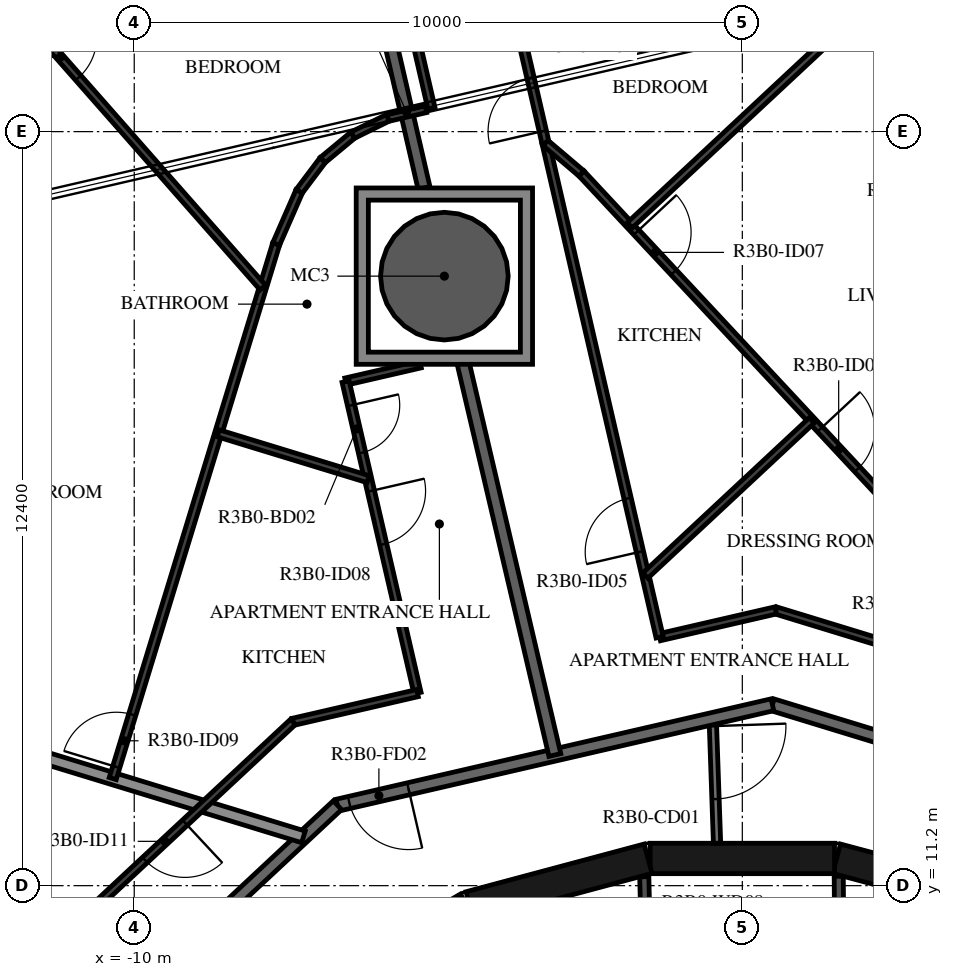
"""IFC4 building model, lengths in metres.
Left out: names, types, materials, properties, quantities, classifications, styles, units other than length and angle.
Written with IfcOpenShell. Run it as: python <this file> out.ifc"""

import sys

from ifc_helpers import new_model, si_unit, direction, frame, frame_2d, origin, origin_2d, place, context, subcontext, project, spatial, polyline, rectangle, hollow_circle, outline, extrude, element, fill, save


model = new_model("IFC4")
c1 = context("Model", 3, precision=1e-05, world=origin(), true_north=direction((0.0, 1.0)))
c2 = subcontext(c1, "Body", "Model", "MODEL_VIEW")
j1 = project(units=[si_unit("LENGTHUNIT", "METRE"), si_unit("PLANEANGLEUNIT", "RADIAN")], contexts=[c1])
p1 = place(None, origin())
s1 = spatial("IfcSite", under=j1, at=p1, CompositionType="ELEMENT")
p2 = place(p1, origin())
s2 = spatial("IfcBuilding", under=s1, at=p2, CompositionType="ELEMENT")
p3 = place(p2, frame((0.0, 0.0, 127.4)))
s3 = spatial("IfcBuildingStorey", under=s2, at=p3, CompositionType="ELEMENT", Elevation=127.4)
p4 = place(p3, frame((-4.9, 21.223, -0.38), z_axis=(0.0, 0.0, 1.0), x_axis=(1.0, 0.0, 0.0)))
e1 = element("IfcColumn", 1, at=p4, inside=s3, PredefinedType="COLUMN", context=c2, shape_type="SweptSolid", body=[
    extrude(hollow_circle(Radius=1.05, WallThickness=0.05, at=origin_2d()), origin(), (0.0, 0.0, 1.0), 3.5),
])
for number, where, z_axis, x_axis in (
    (2, (4.479, 10.858, 0.0), (0.0, 0.0, 1.0), (-0.966, 0.259, 0.0)),
    (3, (1.516, 11.647, 0.0), (0.0, 0.0, 1.0), (-1.0, 0.0, 0.0)),
    (4, (-1.55, 11.643, 0.0), (0.0, 0.0, 1.0), (-0.966, -0.259, 0.0)),
    (5, (-4.51, 10.845, 0.0), (0.0, 0.0, 1.0), (-0.866, -0.5, 0.0)),
):
    element("IfcWall", number, at=place(p3, frame(where, z_axis=z_axis, x_axis=x_axis)), inside=s3, PredefinedType="SHEAR", context=c2, shape_type="SweptSolid", body=[
        extrude(rectangle(XDim=3.033, YDim=0.5, at=frame_2d((1.516, 0.0))), origin(), (0.0, 0.0, 1.0), 3.12),
    ])
p5 = place(p3, frame((1.586, 11.354, 0.0), z_axis=(0.0, 0.0, 1.0), x_axis=(0.007227482881, -0.999973881405, 0.0)))
e6 = element("IfcWall", 6, at=p5, inside=s3, PredefinedType="PARTITIONING", context=c2, shape_type="SweptSolid", body=[
    extrude(rectangle(XDim=2.365, YDim=0.15, at=frame_2d((1.182, 0.0))), origin(), (0.0, 0.0, 1.0), 3.12),
])
p6 = place(p5, frame((0.732, 0.0, 0.0)))
e7 = element("IfcOpeningElement", 7, at=p6, cuts=e6, PredefinedType="OPENING", context=c2, shape_type="SweptSolid", body=[
    extrude(rectangle(XDim=0.9, YDim=2.1, at=frame_2d((0.45, 1.05))), frame((0.0, 0.085, 0.0), z_axis=(0.0, -1.0, 0.0), x_axis=(1.0, 0.0, 0.0)), (0.0, 0.0, 1.0), 0.17),
])
p7 = place(p3, frame((-1.555, 8.99, 0.0), z_axis=(0.0, 0.0, 1.0), x_axis=(-0.024125549686, 0.999708936567, 0.0)))
e8 = element("IfcWall", 8, at=p7, inside=s3, PredefinedType="PARTITIONING", context=c2, shape_type="SweptSolid", body=[
    extrude(rectangle(XDim=2.358, YDim=0.15, at=frame_2d((1.179, 0.0))), origin(), (0.0, 0.0, 1.0), 3.12),
])
p8 = place(p7, frame((0.729, 0.0, 0.0)))
e9 = element("IfcOpeningElement", 9, at=p8, cuts=e8, PredefinedType="OPENING", context=c2, shape_type="SweptSolid", body=[
    extrude(rectangle(XDim=0.9, YDim=2.1, at=frame_2d((0.45, 1.05))), frame((0.0, 0.085, 0.0), z_axis=(0.0, -1.0, 0.0), x_axis=(1.0, 0.0, 0.0)), (0.0, 0.0, 1.0), 0.17),
])
p9 = place(p3, frame((-0.487, 13.948, 0.0), z_axis=(0.0, 0.0, 1.0), x_axis=(0.034859752231, -0.999392214135, 0.0)))
e10 = element("IfcWall", 10, at=p9, inside=s3, PredefinedType="PARTITIONING", context=c2, shape_type="SweptSolid", body=[
    extrude(rectangle(XDim=2.052, YDim=0.12, at=frame_2d((1.026, 0.0))), origin(), (0.0, 0.0, 1.0), 3.12),
])
p10 = place(p9, frame((0.125, 0.0, 0.0)))
e11 = element("IfcOpeningElement", 11, at=p10, cuts=e10, PredefinedType="OPENING", context=c2, shape_type="SweptSolid", body=[
    extrude(rectangle(XDim=1.2, YDim=2.1, at=frame_2d((0.6, 1.05))), frame((0.0, 0.07, 0.0), z_axis=(0.0, -1.0, 0.0), x_axis=(1.0, 0.0, 0.0)), (0.0, 0.0, 1.0), 0.14),
])
p11 = place(p3, frame((7.516, 12.028, 0.0), z_axis=(0.0, 0.0, 1.0), x_axis=(-0.956306642771, 0.292365533182, 0.0)))
e12 = element("IfcWall", 12, at=p11, inside=s3, PredefinedType="STANDARD", context=c2, shape_type="SweptSolid", body=[
    extrude(rectangle(XDim=7.342, YDim=0.2, at=frame_2d((3.671, 0.0))), origin(), (0.0, 0.0, 1.0), 3.12),
])
p12 = place(p3, frame((0.495, 14.175, 0.0), z_axis=(0.0, 0.0, 1.0), x_axis=(-0.974376622151, -0.224922649383, 0.0)))
e13 = element("IfcWall", 13, at=p12, inside=s3, PredefinedType="STANDARD", context=c2, shape_type="SweptSolid", body=[
    extrude(rectangle(XDim=7.342, YDim=0.2, at=frame_2d((3.671, 0.0))), origin(), (0.0, 0.0, 1.0), 3.12),
])
p13 = place(p12, frame((6.142, 0.0, 0.0)))
e14 = element("IfcOpeningElement", 14, at=p13, cuts=e13, PredefinedType="OPENING", context=c2, shape_type="SweptSolid", body=[
    extrude(rectangle(XDim=1.0, YDim=2.1, at=frame_2d((0.5, 1.05))), frame((0.0, 0.11, 0.0), z_axis=(0.0, -1.0, 0.0), x_axis=(1.0, 0.0, 0.0)), (0.0, 0.0, 1.0), 0.22),
])
p14 = place(p3, frame((-6.659, 12.523, 0.0), z_axis=(0.0, 0.0, 1.0), x_axis=(-0.731350455479, -0.682001841105, 0.0)))
e15 = element("IfcWall", 15, at=p14, inside=s3, PredefinedType="STANDARD", context=c2, shape_type="SweptSolid", body=[
    extrude(rectangle(XDim=7.342, YDim=0.2, at=frame_2d((3.671, 0.0))), origin(), (0.0, 0.0, 1.0), 3.12),
])
p15 = place(p14, frame((4.264, 0.0, 0.0)))
e16 = element("IfcOpeningElement", 16, at=p15, cuts=e15, PredefinedType="OPENING", context=c2, shape_type="SweptSolid", body=[
    extrude(rectangle(XDim=1.0, YDim=2.1, at=frame_2d((0.5, 1.05))), frame((0.0, 0.11, 0.0), z_axis=(0.0, -1.0, 0.0), x_axis=(1.0, 0.0, 0.0)), (0.0, 0.0, 1.0), 0.22),
])
p16 = place(p3, frame((-4.602, 19.839, 0.0), z_axis=(0.0, 0.0, 1.0), x_axis=(0.227891855607, -0.973686449607, 0.0)))
e17 = element("IfcWall", 17, at=p16, inside=s3, PredefinedType="STANDARD", context=c2, shape_type="SweptSolid", body=[
    extrude(rectangle(XDim=6.666, YDim=0.2, at=frame_2d((3.333, 0.0))), origin(), (0.0, 0.0, 1.0), 3.12),
])
p17 = place(p3, frame((-6.687, 28.966, 0.0), z_axis=(0.0, 0.0, 1.0), x_axis=(0.224945100086, -0.974371439415, 0.0)))
e18 = element("IfcWall", 18, at=p17, inside=s3, PredefinedType="STANDARD", context=c2, shape_type="SweptSolid", body=[
    extrude(rectangle(XDim=6.458, YDim=0.2, at=frame_2d((3.229, 0.0))), origin(), (0.0, 0.0, 1.0), 3.12),
])
p18 = place(p3, frame((-15.327, 14.481, 0.0), z_axis=(0.0, 0.0, 1.0), x_axis=(0.956303504869, -0.292375796837, 0.0)))
e19 = element("IfcWall", 19, at=p18, inside=s3, PredefinedType="STANDARD", context=c2, shape_type="SweptSolid", body=[
    extrude(rectangle(XDim=8.48, YDim=0.2, at=frame_2d((4.24, 0.0))), origin(), (0.0, 0.0, 1.0), 2.73),
])
p19 = place(p3, frame((5.453, 14.228, 0.0), z_axis=(0.0, 0.0, 1.0), x_axis=(-0.95630868333, 0.292358858576, 0.0)))
e20 = element("IfcWall", 20, at=p19, inside=s3, PredefinedType="PARTITIONING", context=c2, shape_type="SweptSolid", body=[
    extrude(rectangle(XDim=5.127, YDim=0.12, at=frame_2d((2.564, 0.0))), origin(), (0.0, 0.0, 1.0), 3.12),
])
p20 = place(p19, frame((1.5, 0.0, 0.0)))
e21 = element("IfcOpeningElement", 21, at=p20, cuts=e20, PredefinedType="OPENING", context=c2, shape_type="SweptSolid", body=[
    extrude(rectangle(XDim=0.9, YDim=2.1, at=frame_2d((0.45, 1.05))), frame((0.0, 0.07, 0.0), z_axis=(0.0, -1.0, 0.0), x_axis=(1.0, 0.0, 0.0)), (0.0, 0.0, 1.0), 0.14),
])
p21 = place(p3, frame((0.549, 15.727, 0.0), z_axis=(0.0, 0.0, 1.0), x_axis=(-0.974374390785, -0.22493231556, 0.0)))
e22 = element("IfcWall", 22, at=p21, inside=s3, PredefinedType="PARTITIONING", context=c2, shape_type="SweptSolid", body=[
    extrude(rectangle(XDim=1.959, YDim=0.12, at=frame_2d((0.979, 0.0))), origin(), (0.0, 0.0, 1.0), 3.12),
])
p22 = place(p3, frame((-1.36, 15.286, 0.0), z_axis=(0.0, 0.0, 1.0), x_axis=(-0.224974943676, 0.97436454919, 0.0)))
e23 = element("IfcWall", 23, at=p22, inside=s3, PredefinedType="PARTITIONING", context=c2, shape_type="SweptSolid", body=[
    extrude(rectangle(XDim=8.341, YDim=0.12, at=frame_2d((4.17, 0.0))), origin(), (0.0, 0.0, 1.0), 3.12),
])
p23 = place(p22, frame((1.441, 0.0, 0.0)))
e24 = element("IfcOpeningElement", 24, at=p23, cuts=e23, PredefinedType="OPENING", context=c2, shape_type="SweptSolid", body=[
    extrude(rectangle(XDim=0.9, YDim=2.1, at=frame_2d((0.45, 1.05))), frame((0.0, 0.07, 0.0), z_axis=(0.0, -1.0, 0.0), x_axis=(1.0, 0.0, 0.0)), (0.0, 0.0, 1.0), 0.14),
])
p24 = place(p3, frame((-3.236, 23.413, 0.0), z_axis=(0.0, 0.0, 1.0), x_axis=(-0.224934720918, 0.97437383551, 0.0)))
e25 = element("IfcWall", 25, at=p24, inside=s3, PredefinedType="PARTITIONING", context=c2, shape_type="SweptSolid", body=[
    extrude(rectangle(XDim=4.03, YDim=0.12, at=frame_2d((2.015, 0.0))), origin(), (0.0, 0.0, 1.0), 3.12),
])
p25 = place(p24, frame((0.2, 0.0, 0.0)))
e26 = element("IfcOpeningElement", 26, at=p25, cuts=e25, PredefinedType="OPENING", context=c2, shape_type="SweptSolid", body=[
    extrude(rectangle(XDim=0.9, YDim=2.1, at=frame_2d((0.45, 1.05))), frame((0.0, 0.07, 0.0), z_axis=(0.0, -1.0, 0.0), x_axis=(1.0, 0.0, 0.0)), (0.0, 0.0, 1.0), 0.14),
])
p26 = place(p3, frame((-5.799, 26.957, 0.0), z_axis=(0.0, 0.0, 1.0), x_axis=(0.224876960008, -0.974387167843, 0.0)))
e27 = element("IfcWall", 27, at=p26, inside=s3, PredefinedType="PARTITIONING", context=c2, shape_type="SweptSolid", body=[
    extrude(rectangle(XDim=3.065, YDim=0.12, at=frame_2d((1.532, 0.0))), origin(), (0.0, 0.0, 1.0), 3.12),
])
p27 = place(p3, frame((-5.205, 23.971, 0.0), z_axis=(0.0, 0.0, 1.0), x_axis=(-0.974410422398, -0.224776174722, 0.0)))
e28 = element("IfcWall", 28, at=p27, inside=s3, PredefinedType="PARTITIONING", context=c2, shape_type="SweptSolid", body=[
    extrude(rectangle(XDim=0.642, YDim=0.12, at=frame_2d((0.321, 0.0))), origin(), (0.0, 0.0, 1.0), 3.12),
])
p28 = place(p3, frame((-2.646, 22.912, 0.0), z_axis=(0.0, 0.0, 1.0), x_axis=(0.68200318122, -0.731349205788, 0.0)))
e29 = element("IfcWall", 29, at=p28, inside=s3, PredefinedType="PARTITIONING", context=c2, shape_type="SweptSolid", body=[
    extrude(rectangle(XDim=11.874, YDim=0.12, at=frame_2d((5.937, 0.0))), origin(), (0.0, 0.0, 1.0), 3.12),
])
p29 = place(p28, frame((5.752, 0.0, 0.0)))
e30 = element("IfcOpeningElement", 30, at=p29, cuts=e29, PredefinedType="OPENING", context=c2, shape_type="SweptSolid", body=[
    extrude(rectangle(XDim=0.9, YDim=2.1, at=frame_2d((0.45, 1.05))), frame((0.0, 0.07, 0.0), z_axis=(0.0, -1.0, 0.0), x_axis=(1.0, 0.0, 0.0)), (0.0, 0.0, 1.0), 0.14),
])
p30 = place(p28, frame((1.324, 0.0, 0.0)))
e31 = element("IfcOpeningElement", 31, at=p30, cuts=e29, PredefinedType="OPENING", context=c2, shape_type="SweptSolid", body=[
    extrude(rectangle(XDim=0.9, YDim=2.1, at=frame_2d((0.45, 1.05))), frame((0.0, 0.07, 0.0), z_axis=(0.0, -1.0, 0.0), x_axis=(1.0, 0.0, 0.0)), (0.0, 0.0, 1.0), 0.14),
])
p31 = place(p3, frame((1.951, 25.607, 0.0), z_axis=(0.0, 0.0, 1.0), x_axis=(-0.73134872518, -0.682003696601, 0.0)))
e32 = element("IfcWall", 32, at=p31, inside=s3, PredefinedType="PARTITIONING", context=c2, shape_type="SweptSolid", body=[
    extrude(rectangle(XDim=5.2, YDim=0.12, at=frame_2d((2.6, 0.0))), origin(), (0.0, 0.0, 1.0), 2.73),
])
p32 = place(p3, frame((1.141, 18.851, 0.0), z_axis=(0.0, 0.0, 1.0), x_axis=(-0.731352611136, -0.68199952946, 0.0)))
e33 = element("IfcWall", 33, at=p32, inside=s3, PredefinedType="PARTITIONING", context=c2, shape_type="SweptSolid", body=[
    extrude(rectangle(XDim=3.74, YDim=0.12, at=frame_2d((1.87, 0.0))), origin(), (0.0, 0.0, 1.0), 3.12),
])
p33 = place(p3, frame((-3.236, 23.413, 0.0), z_axis=(0.0, 0.0, 1.0), x_axis=(0.762429029489, -0.647071846855, 0.0)))
e34 = element("IfcWall", 34, at=p33, inside=s3, PredefinedType="PARTITIONING", context=c2, shape_type="SweptSolid", body=[
    extrude(rectangle(XDim=0.775, YDim=0.12, at=frame_2d((0.387, 0.0))), origin(), (0.0, 0.0, 1.0), 3.12),
])
p34 = place(p3, frame((-5.293, 19.773, 0.0), z_axis=(0.0, 0.0, 1.0), x_axis=(-0.974391195695, -0.224859506699, 0.0)))
e35 = element("IfcWall", 35, at=p34, inside=s3, PredefinedType="PARTITIONING", context=c2, shape_type="SweptSolid", body=[
    extrude(rectangle(XDim=1.264, YDim=0.12, at=frame_2d((0.632, 0.0))), origin(), (0.0, 0.0, 1.0), 3.12),
])
p35 = place(p3, frame((-6.524, 19.489, 0.0), z_axis=(0.0, 0.0, 1.0), x_axis=(0.22494768659, -0.974370842286, 0.0)))
e36 = element("IfcWall", 36, at=p35, inside=s3, PredefinedType="PARTITIONING", context=c2, shape_type="SweptSolid", body=[
    extrude(rectangle(XDim=5.257, YDim=0.12, at=frame_2d((2.629, 0.0))), origin(), (0.0, 0.0, 1.0), 3.12),
])
p36 = place(p35, frame((0.4, 0.0, 0.0)))
e37 = element("IfcOpeningElement", 37, at=p36, cuts=e36, PredefinedType="OPENING", context=c2, shape_type="SweptSolid", body=[
    extrude(rectangle(XDim=0.8, YDim=2.1, at=frame_2d((0.4, 1.05))), frame((0.0, 0.07, 0.0), z_axis=(0.0, -1.0, 0.0), x_axis=(1.0, 0.0, 0.0)), (0.0, 0.0, 1.0), 0.14),
])
p37 = place(p35, frame((1.846, 0.0, 0.0)))
e38 = element("IfcOpeningElement", 38, at=p37, cuts=e36, PredefinedType="OPENING", context=c2, shape_type="SweptSolid", body=[
    extrude(rectangle(XDim=0.9, YDim=2.1, at=frame_2d((0.45, 1.05))), frame((0.0, 0.07, 0.0), z_axis=(0.0, -1.0, 0.0), x_axis=(1.0, 0.0, 0.0)), (0.0, 0.0, 1.0), 0.14),
])
p38 = place(p3, frame((-5.342, 14.367, 0.0), z_axis=(0.0, 0.0, 1.0), x_axis=(-0.974367677287, -0.224961395484, 0.0)))
e39 = element("IfcWall", 39, at=p38, inside=s3, PredefinedType="PARTITIONING", context=c2, shape_type="SweptSolid", body=[
    extrude(rectangle(XDim=2.1, YDim=0.12, at=frame_2d((1.05, 0.0))), origin(), (0.0, 0.0, 1.0), 3.12),
])
p39 = place(p3, frame((-7.388, 13.894, 0.0), z_axis=(0.0, 0.0, 1.0), x_axis=(-0.731357186721, -0.681994622729, 0.0)))
e40 = element("IfcWall", 40, at=p39, inside=s3, PredefinedType="PARTITIONING", context=c2, shape_type="SweptSolid", body=[
    extrude(rectangle(XDim=8.146, YDim=0.12, at=frame_2d((4.073, 0.0))), origin(), (0.0, 0.0, 1.0), 3.12),
])
p40 = place(p39, frame((2.432, 0.0, 0.0)))
e41 = element("IfcOpeningElement", 41, at=p40, cuts=e40, PredefinedType="OPENING", context=c2, shape_type="SweptSolid", body=[
    extrude(rectangle(XDim=0.9, YDim=2.1, at=frame_2d((0.45, 1.05))), frame((0.0, 0.07, 0.0), z_axis=(0.0, -1.0, 0.0), x_axis=(1.0, 0.0, 0.0)), (0.0, 0.0, 1.0), 0.14),
])
p41 = place(p39, frame((7.046, 0.0, 0.0)))
e42 = element("IfcOpeningElement", 42, at=p41, cuts=e40, PredefinedType="OPENING", context=c2, shape_type="SweptSolid", body=[
    extrude(rectangle(XDim=0.9, YDim=2.1, at=frame_2d((0.45, 1.05))), frame((0.0, 0.07, 0.0), z_axis=(0.0, -1.0, 0.0), x_axis=(1.0, 0.0, 0.0)), (0.0, 0.0, 1.0), 0.14),
])
p42 = place(p3, frame((-10.354, 12.961, 0.0), z_axis=(0.0, 0.0, 1.0), x_axis=(0.292379778045, 0.956302287663, 0.0)))
e43 = element("IfcWall", 43, at=p42, inside=s3, PredefinedType="PARTITIONING", context=c2, shape_type="SweptSolid", body=[
    extrude(rectangle(XDim=9.194, YDim=0.12, at=frame_2d((4.597, 0.0))), origin(), (0.0, 0.0, 1.0), 3.12),
])
p43 = place(p42, frame((0.2, 0.0, 0.0)))
e44 = element("IfcOpeningElement", 44, at=p43, cuts=e43, PredefinedType="OPENING", context=c2, shape_type="SweptSolid", body=[
    extrude(rectangle(XDim=0.9, YDim=2.1, at=frame_2d((0.45, 1.05))), frame((0.0, 0.07, 0.0), z_axis=(0.0, -1.0, 0.0), x_axis=(1.0, 0.0, 0.0)), (0.0, 0.0, 1.0), 0.14),
])
p44 = place(p3, frame((-7.666, 21.753, 0.0), z_axis=(0.0, 0.0, 1.0), x_axis=(0.401562829944, 0.915831476642, 0.0)))
e45 = element("IfcWall", 45, at=p44, inside=s3, PredefinedType="PARTITIONING", context=c2, shape_type="SweptSolid", body=[
    extrude(rectangle(XDim=0.947, YDim=0.12, at=frame_2d((0.473, 0.0))), origin(), (0.0, 0.0, 1.0), 3.12),
])
p45 = place(p3, frame((-7.286, 22.62, 0.0), z_axis=(0.0, 0.0, 1.0), x_axis=(0.601702575527, 0.798720233, 0.0)))
e46 = element("IfcWall", 46, at=p45, inside=s3, PredefinedType="PARTITIONING", context=c2, shape_type="SweptSolid", body=[
    extrude(rectangle(XDim=0.642, YDim=0.12, at=frame_2d((0.321, 0.0))), origin(), (0.0, 0.0, 1.0), 3.12),
])
p46 = place(p3, frame((-6.9, 23.132, 0.0), z_axis=(0.0, 0.0, 1.0), x_axis=(0.769653132962, 0.638462258025, 0.0)))
e47 = element("IfcWall", 47, at=p46, inside=s3, PredefinedType="PARTITIONING", context=c2, shape_type="SweptSolid", body=[
    extrude(rectangle(XDim=0.642, YDim=0.12, at=frame_2d((0.321, 0.0))), origin(), (0.0, 0.0, 1.0), 3.12),
])
p47 = place(p3, frame((-6.406, 23.542, 0.0), z_axis=(0.0, 0.0, 1.0), x_axis=(0.896245703043, 0.44355793283, 0.0)))
e48 = element("IfcWall", 48, at=p47, inside=s3, PredefinedType="PARTITIONING", context=c2, shape_type="SweptSolid", body=[
    extrude(rectangle(XDim=0.642, YDim=0.12, at=frame_2d((0.321, 0.0))), origin(), (0.0, 0.0, 1.0), 3.12),
])
p48 = place(p3, frame((-11.713, 25.385, 0.0), z_axis=(0.0, 0.0, 1.0), x_axis=(0.660694383024, -0.750655002142, 0.0)))
e49 = element("IfcWall", 49, at=p48, inside=s3, PredefinedType="PARTITIONING", context=c2, shape_type="SweptSolid", body=[
    extrude(rectangle(XDim=5.794, YDim=0.12, at=frame_2d((2.897, 0.0))), origin(), (0.0, 0.0, 1.0), 3.12),
])
p49 = place(p48, frame((0.3, 0.0, 0.0)))
e50 = element("IfcOpeningElement", 50, at=p49, cuts=e49, PredefinedType="OPENING", context=c2, shape_type="SweptSolid", body=[
    extrude(rectangle(XDim=0.9, YDim=2.1, at=frame_2d((0.45, 1.05))), frame((0.0, 0.07, 0.0), z_axis=(0.0, -1.0, 0.0), x_axis=(1.0, 0.0, 0.0)), (0.0, 0.0, 1.0), 0.14),
])
p50 = place(p3, frame((-8.618, 18.639, 0.0), z_axis=(0.0, 0.0, 1.0), x_axis=(0.956305961168, -0.292367762647, 0.0)))
e51 = element("IfcWall", 51, at=p50, inside=s3, PredefinedType="PARTITIONING", context=c2, shape_type="SweptSolid", body=[
    extrude(rectangle(XDim=2.577, YDim=0.12, at=frame_2d((1.289, 0.0))), origin(), (0.0, 0.0, 1.0), 3.12),
])
p51 = place(p3, origin())
e52 = element("IfcWall", 52, at=p51, inside=s3, PredefinedType="STANDARD", context=c2, shape_type="SweptSolid", body=[
    extrude(outline(polyline([(-3.45, 22.674), (-3.45, 19.773), (-6.35, 19.773), (-6.35, 22.674), (-3.45, 22.674)]), holes=[polyline([(-6.15, 19.973), (-3.65, 19.973), (-3.65, 22.473), (-6.15, 22.473), (-6.15, 19.973)])]), origin(), (0.0, 0.0, 1.0), 3.12),
])
p52 = place(p25, origin())
e53 = element("IfcDoor", 53, at=p52, inside=s3, OperationType="SINGLE_SWING_LEFT", PredefinedType="DOOR", context=c2, shape_type="SweptSolid", body=[
    extrude(rectangle(XDim=0.9, YDim=2.1, at=frame_2d((0.45, 1.05))), frame((0.0, 0.025, 0.0), z_axis=(0.0, -1.0, 0.0), x_axis=(1.0, 0.0, 0.0)), (0.0, 0.0, 1.0), 0.05),
])
fill(e26, e53)
p53 = place(p23, origin())
e54 = element("IfcDoor", 54, at=p53, inside=s3, OperationType="SINGLE_SWING_RIGHT", PredefinedType="DOOR", context=c2, shape_type="SweptSolid", body=[
    extrude(rectangle(XDim=0.9, YDim=2.1, at=frame_2d((0.45, 1.05))), frame((0.0, 0.025, 0.0), z_axis=(0.0, -1.0, 0.0), x_axis=(1.0, 0.0, 0.0)), (0.0, 0.0, 1.0), 0.05),
])
fill(e24, e54)
p54 = place(p29, origin())
e55 = element("IfcDoor", 55, at=p54, inside=s3, OperationType="SINGLE_SWING_RIGHT", PredefinedType="DOOR", context=c2, shape_type="SweptSolid", body=[
    extrude(rectangle(XDim=0.9, YDim=2.1, at=frame_2d((0.45, 1.05))), frame((0.0, 0.025, 0.0), z_axis=(0.0, -1.0, 0.0), x_axis=(1.0, 0.0, 0.0)), (0.0, 0.0, 1.0), 0.05),
])
fill(e30, e55)
p55 = place(p30, origin())
e56 = element("IfcDoor", 56, at=p55, inside=s3, OperationType="SINGLE_SWING_LEFT", PredefinedType="DOOR", context=c2, shape_type="SweptSolid", body=[
    extrude(rectangle(XDim=0.9, YDim=2.1, at=frame_2d((0.45, 1.05))), frame((0.0, 0.025, 0.0), z_axis=(0.0, -1.0, 0.0), x_axis=(1.0, 0.0, 0.0)), (0.0, 0.0, 1.0), 0.05),
])
fill(e31, e56)
p56 = place(p13, origin())
e57 = element("IfcDoor", 57, at=p56, inside=s3, OperationType="SINGLE_SWING_LEFT", PredefinedType="DOOR", context=c2, shape_type="SweptSolid", body=[
    extrude(rectangle(XDim=1.0, YDim=2.1, at=frame_2d((0.5, 1.05))), frame((0.0, 0.025, 0.0), z_axis=(0.0, -1.0, 0.0), x_axis=(1.0, 0.0, 0.0)), (0.0, 0.0, 1.0), 0.05),
])
fill(e14, e57)
p57 = place(p36, origin())
e58 = element("IfcDoor", 58, at=p57, inside=s3, OperationType="SINGLE_SWING_LEFT", PredefinedType="DOOR", context=c2, shape_type="SweptSolid", body=[
    extrude(rectangle(XDim=0.8, YDim=2.1, at=frame_2d((0.4, 1.05))), frame((0.0, 0.025, 0.0), z_axis=(0.0, -1.0, 0.0), x_axis=(1.0, 0.0, 0.0)), (0.0, 0.0, 1.0), 0.05),
])
fill(e37, e58)
p58 = place(p37, origin())
e59 = element("IfcDoor", 59, at=p58, inside=s3, OperationType="SINGLE_SWING_LEFT", PredefinedType="DOOR", context=c2, shape_type="SweptSolid", body=[
    extrude(rectangle(XDim=0.9, YDim=2.1, at=frame_2d((0.45, 1.05))), frame((0.0, 0.025, 0.0), z_axis=(0.0, -1.0, 0.0), x_axis=(1.0, 0.0, 0.0)), (0.0, 0.0, 1.0), 0.05),
])
fill(e38, e59)
p59 = place(p43, origin())
e60 = element("IfcDoor", 60, at=p59, inside=s3, OperationType="SINGLE_SWING_LEFT", PredefinedType="DOOR", context=c2, shape_type="SweptSolid", body=[
    extrude(rectangle(XDim=0.9, YDim=2.1, at=frame_2d((0.45, 1.05))), frame((0.0, 0.025, 0.0), z_axis=(0.0, -1.0, 0.0), x_axis=(1.0, 0.0, 0.0)), (0.0, 0.0, 1.0), 0.05),
])
fill(e44, e60)
p60 = place(p49, origin())
e61 = element("IfcDoor", 61, at=p60, inside=s3, OperationType="SINGLE_SWING_LEFT", PredefinedType="DOOR", context=c2, shape_type="SweptSolid", body=[
    extrude(rectangle(XDim=0.9, YDim=2.1, at=frame_2d((0.45, 1.05))), frame((0.0, 0.025, 0.0), z_axis=(0.0, -1.0, 0.0), x_axis=(1.0, 0.0, 0.0)), (0.0, 0.0, 1.0), 0.05),
])
fill(e50, e61)
p61 = place(p40, origin())
e62 = element("IfcDoor", 62, at=p61, inside=s3, OperationType="SINGLE_SWING_LEFT", PredefinedType="DOOR", context=c2, shape_type="SweptSolid", body=[
    extrude(rectangle(XDim=0.9, YDim=2.1, at=frame_2d((0.45, 1.05))), frame((0.0, 0.025, 0.0), z_axis=(0.0, -1.0, 0.0), x_axis=(1.0, 0.0, 0.0)), (0.0, 0.0, 1.0), 0.05),
])
fill(e41, e62)
p62 = place(p10, origin())
e63 = element("IfcDoor", 63, at=p62, inside=s3, OperationType="DOUBLE_DOOR_SINGLE_SWING", PredefinedType="DOOR", context=c2, shape_type="SweptSolid", body=[
    extrude(rectangle(XDim=1.2, YDim=2.1, at=frame_2d((0.6, 1.05))), frame((0.0, 0.025, 0.0), z_axis=(0.0, -1.0, 0.0), x_axis=(1.0, 0.0, 0.0)), (0.0, 0.0, 1.0), 0.05),
])
fill(e11, e63)
save(model, sys.argv[1])
